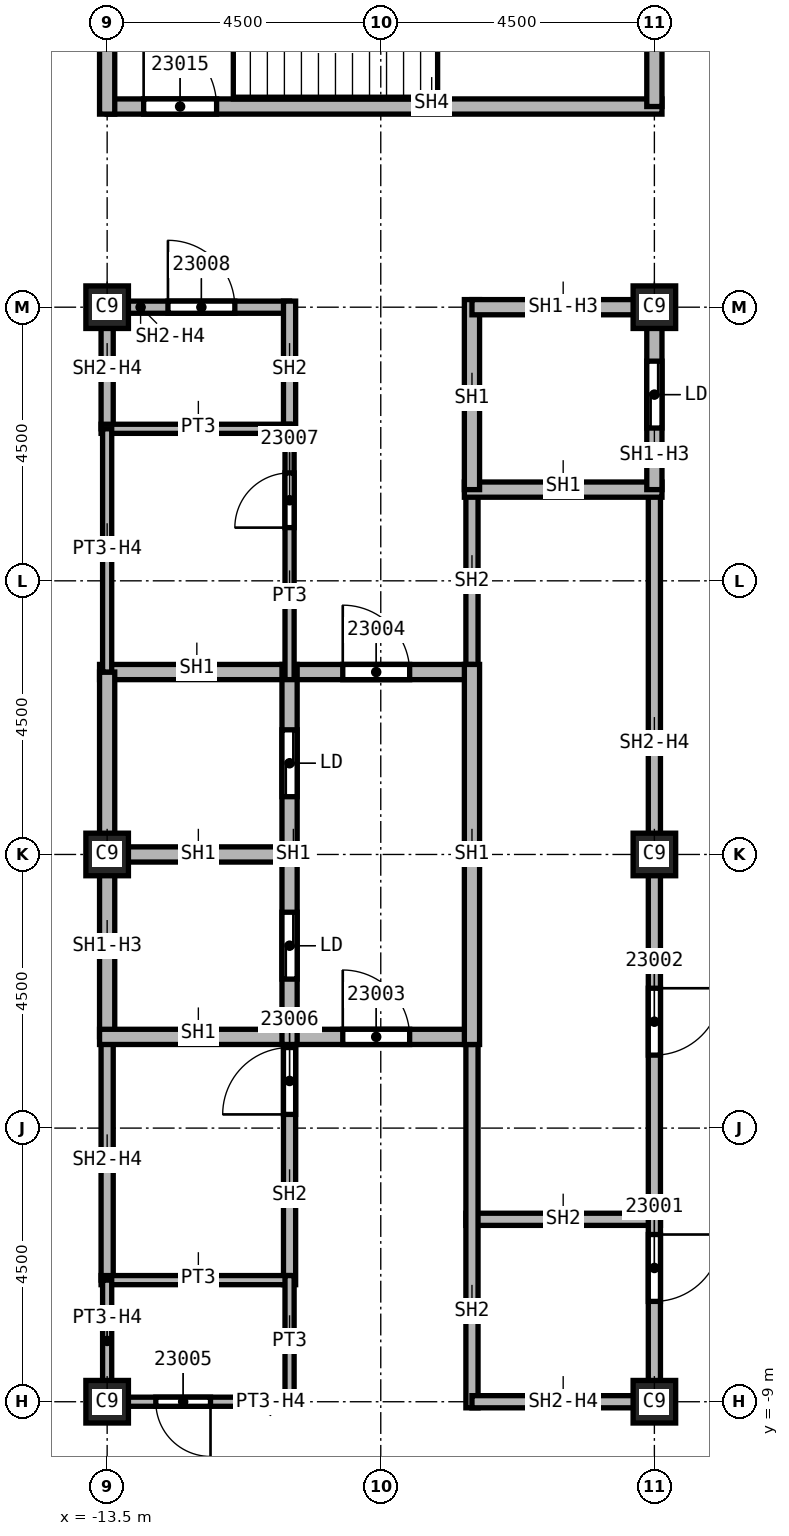
"""IFC4 building model, lengths in metres.
Left out: names, types, materials, properties, quantities, classifications, styles, units other than length and angle.
Written with IfcOpenShell. Run it as: python <this file> out.ifc"""

import sys

from ifc_helpers import new_model, si_unit, direction, frame, frame_2d, origin, origin_2d, place, context, subcontext, project, spatial, rectangle, extrude, element, fill, save


model = new_model("IFC4")
c1 = context("Model", 3, precision=1e-05, world=origin(), true_north=direction((0.0, 1.0)))
c2 = subcontext(c1, "Body", "Model", "MODEL_VIEW")
j1 = project(units=[si_unit("LENGTHUNIT", "METRE"), si_unit("PLANEANGLEUNIT", "RADIAN")], contexts=[c1])
p1 = place(None, origin())
s1 = spatial("IfcSite", under=j1, at=p1, CompositionType="ELEMENT")
p2 = place(p1, origin())
s2 = spatial("IfcBuilding", under=s1, at=p2, CompositionType="ELEMENT")
p3 = place(p2, frame((0.0, 0.0, 330.0)))
s3 = spatial("IfcBuildingStorey", under=s2, at=p3, CompositionType="ELEMENT", Elevation=330.0)
for number, where, z_axis, x_axis in (
    (1, (-4.5, 0.0, 0.0), (0.0, 0.0, 1.0), (1.0, 0.0, 0.0)),
    (2, (-4.5, 9.0, 0.0), (0.0, 0.0, 1.0), (1.0, 0.0, 0.0)),
    (3, (-4.5, -9.0, 0.0), (0.0, 0.0, 1.0), (1.0, 0.0, 0.0)),
    (4, (-13.5, 0.0, 0.0), (0.0, 0.0, 1.0), (1.0, 0.0, 0.0)),
    (5, (-13.5, 9.0, 0.0), (0.0, 0.0, 1.0), (1.0, 0.0, 0.0)),
    (6, (-13.5, -9.0, 0.0), (0.0, 0.0, 1.0), (1.0, 0.0, 0.0)),
):
    element("IfcColumn", number, at=place(p3, frame(where, z_axis=z_axis, x_axis=x_axis)), inside=s3, PredefinedType="COLUMN", context=c2, shape_type="SweptSolid", body=[
        extrude(rectangle(XDim=0.7, YDim=0.7, at=origin_2d()), origin(), (0.0, 0.0, 1.0), 3.74),
    ])
p4 = place(p3, frame((-13.5, -7.0, 0.0), z_axis=(0.0, 0.0, 1.0), x_axis=(0.0, 1.0, 0.0)))
e7 = element("IfcWall", 7, at=p4, inside=s3, PredefinedType="SOLIDWALL", context=c2, shape_type="SweptSolid", body=[
    extrude(rectangle(XDim=4.0, YDim=0.2, at=frame_2d((2.0, 0.0))), origin(), (0.0, 0.0, 1.0), 3.062),
])
p5 = place(p3, frame((-13.5, 7.0, 0.0), z_axis=(0.0, 0.0, 1.0), x_axis=(0.0, 1.0, 0.0)))
e8 = element("IfcWall", 8, at=p5, inside=s3, PredefinedType="SOLIDWALL", context=c2, shape_type="SweptSolid", body=[
    extrude(rectangle(XDim=2.1, YDim=0.2, at=frame_2d((1.05, 0.0))), origin(), (0.0, 0.0, 1.0), 3.062),
])
p6 = place(p3, frame((-13.5, 9.0, 0.0), z_axis=(0.0, 0.0, 1.0), x_axis=(1.0, 0.0, 0.0)))
e9 = element("IfcWall", 9, at=p6, inside=s3, PredefinedType="SOLIDWALL", context=c2, shape_type="SweptSolid", body=[
    extrude(rectangle(XDim=3.0, YDim=0.2, at=frame_2d((1.5, 0.0))), origin(), (0.0, 0.0, 1.0), 3.062),
])
p7 = place(p6, frame((1.0, 0.0, 0.0)))
e10 = element("IfcOpeningElement", 10, at=p7, cuts=e9, PredefinedType="OPENING", context=c2, shape_type="SweptSolid", body=[
    extrude(rectangle(XDim=1.1, YDim=2.1, at=frame_2d((0.55, 1.05))), frame((0.0, 0.1, 0.0), z_axis=(0.0, -1.0, 0.0), x_axis=(1.0, 0.0, 0.0)), (0.0, 0.0, 1.0), 0.2),
])
p8 = place(p3, frame((-10.5, -7.075, 0.0), z_axis=(0.0, 0.0, 1.0), x_axis=(0.0, 1.0, 0.0)))
e11 = element("IfcWall", 11, at=p8, inside=s3, PredefinedType="SOLIDWALL", context=c2, shape_type="SweptSolid", body=[
    extrude(rectangle(XDim=4.2, YDim=0.2, at=frame_2d((2.1, 0.0))), origin(), (0.0, 0.0, 1.0), 3.74),
])
p9 = place(p8, frame((2.8, 0.0, 0.0)))
e12 = element("IfcOpeningElement", 12, at=p9, cuts=e11, PredefinedType="OPENING", context=c2, shape_type="SweptSolid", body=[
    extrude(rectangle(XDim=1.1, YDim=2.1, at=frame_2d((0.55, 1.05))), frame((0.0, 0.1, 0.0), z_axis=(0.0, -1.0, 0.0), x_axis=(1.0, 0.0, 0.0)), (0.0, 0.0, 1.0), 0.2),
])
p10 = place(p3, frame((-10.5, 6.925, 0.0), z_axis=(0.0, 0.0, 1.0), x_axis=(0.0, 1.0, 0.0)))
e13 = element("IfcWall", 13, at=p10, inside=s3, PredefinedType="SOLIDWALL", context=c2, shape_type="SweptSolid", body=[
    extrude(rectangle(XDim=2.175, YDim=0.2, at=frame_2d((1.087, 0.0))), origin(), (0.0, 0.0, 1.0), 3.74),
])
p11 = place(p3, frame((-7.6, -6.0, 0.0), z_axis=(0.0, 0.0, 1.0), x_axis=(1.0, 0.0, 0.0)))
e14 = element("IfcWall", 14, at=p11, inside=s3, PredefinedType="SOLIDWALL", context=c2, shape_type="SweptSolid", body=[
    extrude(rectangle(XDim=3.2, YDim=0.2, at=frame_2d((1.6, 0.0))), origin(), (0.0, 0.0, 1.0), 3.74),
])
p12 = place(p3, frame((-7.5, -9.1, 0.0), z_axis=(0.0, 0.0, 1.0), x_axis=(0.0, 1.0, 0.0)))
e15 = element("IfcWall", 15, at=p12, inside=s3, PredefinedType="SOLIDWALL", context=c2, shape_type="SweptSolid", body=[
    extrude(rectangle(XDim=6.225, YDim=0.2, at=frame_2d((3.113, 0.0))), origin(), (0.0, 0.0, 1.0), 3.74),
])
p13 = place(p3, frame((-7.5, 2.875, 0.0), z_axis=(0.0, 0.0, 1.0), x_axis=(0.0, 1.0, 0.0)))
e16 = element("IfcWall", 16, at=p13, inside=s3, PredefinedType="SOLIDWALL", context=c2, shape_type="SweptSolid", body=[
    extrude(rectangle(XDim=3.125, YDim=0.2, at=frame_2d((1.562, 0.0))), origin(), (0.0, 0.0, 1.0), 3.74),
])
p14 = place(p3, frame((-4.5, -9.0, 0.0), z_axis=(0.0, 0.0, 1.0), x_axis=(-1.0, 0.0, 0.0)))
e17 = element("IfcWall", 17, at=p14, inside=s3, PredefinedType="SOLIDWALL", context=c2, shape_type="SweptSolid", body=[
    extrude(rectangle(XDim=3.0, YDim=0.2, at=frame_2d((1.5, 0.0))), origin(), (0.0, 0.0, 1.0), 3.062),
])
p15 = place(p3, frame((-4.5, 6.0, 0.0), z_axis=(0.0, 0.0, 1.0), x_axis=(0.0, -1.0, 0.0)))
e18 = element("IfcWall", 18, at=p15, inside=s3, PredefinedType="SOLIDWALL", context=c2, shape_type="SweptSolid", body=[
    extrude(rectangle(XDim=15.1, YDim=0.2, at=frame_2d((7.55, 0.0))), origin(), (0.0, 0.0, 1.0), 3.062),
])
p16 = place(p15, frame((12.25, 0.0, 0.0)))
e19 = element("IfcOpeningElement", 19, at=p16, cuts=e18, PredefinedType="OPENING", context=c2, shape_type="SweptSolid", body=[
    extrude(rectangle(XDim=1.1, YDim=2.1, at=frame_2d((0.55, 1.05))), frame((0.0, 0.1, 0.0), z_axis=(0.0, -1.0, 0.0), x_axis=(1.0, 0.0, 0.0)), (0.0, 0.0, 1.0), 0.2),
])
p17 = place(p15, frame((8.2, 0.0, 0.0)))
e20 = element("IfcOpeningElement", 20, at=p17, cuts=e18, PredefinedType="OPENING", context=c2, shape_type="SweptSolid", body=[
    extrude(rectangle(XDim=1.1, YDim=2.1, at=frame_2d((0.55, 1.05))), frame((0.0, 0.1, 0.0), z_axis=(0.0, -1.0, 0.0), x_axis=(1.0, 0.0, 0.0)), (0.0, 0.0, 1.0), 0.2),
])
p18 = place(p3, frame((-13.625, 0.0, 0.0), z_axis=(0.0, 0.0, 1.0), x_axis=(1.0, 0.0, 0.0)))
e21 = element("IfcWall", 21, at=p18, inside=s3, PredefinedType="SOLIDWALL", context=c2, shape_type="SweptSolid", body=[
    extrude(rectangle(XDim=3.125, YDim=0.25, at=frame_2d((1.562, 0.0))), origin(), (0.0, 0.0, 1.0), 3.74),
])
p19 = place(p3, frame((-13.625, 3.0, 0.0), z_axis=(0.0, 0.0, 1.0), x_axis=(1.0, 0.0, 0.0)))
e22 = element("IfcWall", 22, at=p19, inside=s3, PredefinedType="SOLIDWALL", context=c2, shape_type="SweptSolid", body=[
    extrude(rectangle(XDim=6.125, YDim=0.25, at=frame_2d((3.062, 0.0))), origin(), (0.0, 0.0, 1.0), 3.74),
])
p20 = place(p19, frame((4.0, 0.0, 0.0)))
e23 = element("IfcOpeningElement", 23, at=p20, cuts=e22, PredefinedType="OPENING", context=c2, shape_type="SweptSolid", body=[
    extrude(rectangle(XDim=1.1, YDim=2.1, at=frame_2d((0.55, 1.05))), frame((0.0, 0.125, 0.0), z_axis=(0.0, -1.0, 0.0), x_axis=(1.0, 0.0, 0.0)), (0.0, 0.0, 1.0), 0.25),
])
p21 = place(p3, frame((-13.5, -3.0, 0.0), z_axis=(0.0, 0.0, 1.0), x_axis=(0.0, 1.0, 0.0)))
e24 = element("IfcWall", 24, at=p21, inside=s3, PredefinedType="SOLIDWALL", context=c2, shape_type="SweptSolid", body=[
    extrude(rectangle(XDim=6.0, YDim=0.25, at=frame_2d((3.0, 0.0))), origin(), (0.0, 0.0, 1.0), 3.062),
])
p22 = place(p3, frame((-13.625, -3.0, 0.0), z_axis=(0.0, 0.0, 1.0), x_axis=(1.0, 0.0, 0.0)))
e25 = element("IfcWall", 25, at=p22, inside=s3, PredefinedType="SOLIDWALL", context=c2, shape_type="SweptSolid", body=[
    extrude(rectangle(XDim=6.125, YDim=0.25, at=frame_2d((3.062, 0.0))), origin(), (0.0, 0.0, 1.0), 3.74),
])
p23 = place(p22, frame((4.0, 0.0, 0.0)))
e26 = element("IfcOpeningElement", 26, at=p23, cuts=e25, PredefinedType="OPENING", context=c2, shape_type="SweptSolid", body=[
    extrude(rectangle(XDim=1.1, YDim=2.1, at=frame_2d((0.55, 1.05))), frame((0.0, 0.125, 0.0), z_axis=(0.0, -1.0, 0.0), x_axis=(1.0, 0.0, 0.0)), (0.0, 0.0, 1.0), 0.25),
])
p24 = place(p3, frame((-10.5, -3.125, 0.0), z_axis=(0.0, 0.0, 1.0), x_axis=(0.0, 1.0, 0.0)))
e27 = element("IfcWall", 27, at=p24, inside=s3, PredefinedType="SOLIDWALL", context=c2, shape_type="SweptSolid", body=[
    extrude(rectangle(XDim=6.25, YDim=0.25, at=frame_2d((3.125, 0.0))), origin(), (0.0, 0.0, 1.0), 3.74),
])
p25 = place(p24, frame((1.075, 0.0, 0.0)))
e28 = element("IfcOpeningElement", 28, at=p25, cuts=e27, PredefinedType="OPENING", context=c2, shape_type="SweptSolid", body=[
    extrude(rectangle(XDim=1.1, YDim=2.1, at=frame_2d((0.55, 1.05))), frame((0.0, 0.125, 0.0), z_axis=(0.0, -1.0, 0.0), x_axis=(1.0, 0.0, 0.0)), (0.0, 0.0, 1.0), 0.25),
])
p26 = place(p24, frame((4.075, 0.0, 0.0)))
e29 = element("IfcOpeningElement", 29, at=p26, cuts=e27, PredefinedType="OPENING", context=c2, shape_type="SweptSolid", body=[
    extrude(rectangle(XDim=1.1, YDim=2.1, at=frame_2d((0.55, 1.05))), frame((0.0, 0.125, 0.0), z_axis=(0.0, -1.0, 0.0), x_axis=(1.0, 0.0, 0.0)), (0.0, 0.0, 1.0), 0.25),
])
p27 = place(p3, frame((-7.625, 6.0, 0.0), z_axis=(0.0, 0.0, 1.0), x_axis=(1.0, 0.0, 0.0)))
e30 = element("IfcWall", 30, at=p27, inside=s3, PredefinedType="SOLIDWALL", context=c2, shape_type="SweptSolid", body=[
    extrude(rectangle(XDim=3.25, YDim=0.25, at=frame_2d((1.625, 0.0))), origin(), (0.0, 0.0, 1.0), 3.74),
])
p28 = place(p3, frame((-7.5, -3.125, 0.0), z_axis=(0.0, 0.0, 1.0), x_axis=(0.0, 1.0, 0.0)))
e31 = element("IfcWall", 31, at=p28, inside=s3, PredefinedType="SOLIDWALL", context=c2, shape_type="SweptSolid", body=[
    extrude(rectangle(XDim=6.25, YDim=0.25, at=frame_2d((3.125, 0.0))), origin(), (0.0, 0.0, 1.0), 3.74),
])
p29 = place(p3, frame((-7.5, 6.0, 0.0), z_axis=(0.0, 0.0, 1.0), x_axis=(0.0, 1.0, 0.0)))
e32 = element("IfcWall", 32, at=p29, inside=s3, PredefinedType="SOLIDWALL", context=c2, shape_type="SweptSolid", body=[
    extrude(rectangle(XDim=3.125, YDim=0.25, at=frame_2d((1.562, 0.0))), origin(), (0.0, 0.0, 1.0), 3.74),
])
p30 = place(p3, frame((-7.5, 9.0, 0.0), z_axis=(0.0, 0.0, 1.0), x_axis=(1.0, 0.0, 0.0)))
e33 = element("IfcWall", 33, at=p30, inside=s3, PredefinedType="SOLIDWALL", context=c2, shape_type="SweptSolid", body=[
    extrude(rectangle(XDim=3.0, YDim=0.25, at=frame_2d((1.5, 0.0))), origin(), (0.0, 0.0, 1.0), 3.062),
])
p31 = place(p3, frame((-4.5, 9.125, 0.0), z_axis=(0.0, 0.0, 1.0), x_axis=(0.0, -1.0, 0.0)))
e34 = element("IfcWall", 34, at=p31, inside=s3, PredefinedType="SOLIDWALL", context=c2, shape_type="SweptSolid", body=[
    extrude(rectangle(XDim=3.125, YDim=0.25, at=frame_2d((1.562, 0.0))), origin(), (0.0, 0.0, 1.0), 3.062),
])
p32 = place(p31, frame((1.012, 0.0, 0.0)))
e35 = element("IfcOpeningElement", 35, at=p32, cuts=e34, PredefinedType="OPENING", context=c2, shape_type="SweptSolid", body=[
    extrude(rectangle(XDim=1.1, YDim=2.1, at=frame_2d((0.55, 1.05))), frame((0.0, 0.125, 0.0), z_axis=(0.0, -1.0, 0.0), x_axis=(1.0, 0.0, 0.0)), (0.0, 0.0, 1.0), 0.25),
])
p33 = place(p3, frame((-13.5, 12.3, 0.0), z_axis=(0.0, 0.0, 1.0), x_axis=(1.0, 0.0, 0.0)))
e36 = element("IfcWall", 36, at=p33, inside=s3, PredefinedType="SOLIDWALL", context=c2, shape_type="SweptSolid", body=[
    extrude(rectangle(XDim=9.125, YDim=0.25, at=frame_2d((4.562, 0.0))), origin(), (0.0, 0.0, 1.0), 3.74),
])
p34 = place(p33, frame((0.6, 0.0, 0.0)))
e37 = element("IfcOpeningElement", 37, at=p34, cuts=e36, PredefinedType="OPENING", context=c2, shape_type="SweptSolid", body=[
    extrude(rectangle(XDim=1.2, YDim=2.1, at=frame_2d((0.6, 1.05))), frame((0.0, 0.125, 0.0), z_axis=(0.0, -1.0, 0.0), x_axis=(1.0, 0.0, 0.0)), (0.0, 0.0, 1.0), 0.25),
])
p35 = place(p3, frame((-13.5, 12.175, 0.0), z_axis=(0.0, 0.0, 1.0), x_axis=(0.0, 1.0, 0.0)))
e38 = element("IfcWall", 38, at=p35, inside=s3, PredefinedType="SOLIDWALL", context=c2, shape_type="SweptSolid", body=[
    extrude(rectangle(XDim=4.75, YDim=0.25, at=frame_2d((2.375, 0.0))), origin(), (0.0, 0.0, 1.0), 3.74),
])
p36 = place(p3, frame((-4.5, 16.8, 0.0), z_axis=(0.0, 0.0, 1.0), x_axis=(0.0, -1.0, 0.0)))
e39 = element("IfcWall", 39, at=p36, inside=s3, PredefinedType="SOLIDWALL", context=c2, shape_type="SweptSolid", body=[
    extrude(rectangle(XDim=4.5, YDim=0.25, at=frame_2d((2.25, 0.0))), origin(), (0.0, 0.0, 1.0), 3.74),
])
for number, where, z_axis, x_axis in (
    (40, (-13.6, -7.0, 0.0), (0.0, 0.0, 1.0), (1.0, 0.0, 0.0)),
    (41, (-13.6, 7.0, 0.0), (0.0, 0.0, 1.0), (1.0, 0.0, 0.0)),
):
    element("IfcWall", number, at=place(p3, frame(where, z_axis=z_axis, x_axis=x_axis)), inside=s3, PredefinedType="PARTITIONING", context=c2, shape_type="SweptSolid", body=[
        extrude(rectangle(XDim=3.1, YDim=0.15, at=frame_2d((1.55, 0.0))), origin(), (0.0, 0.0, 1.0), 3.74),
    ])
p37 = place(p3, frame((-13.5, -9.075, 0.0), z_axis=(0.0, 0.0, 1.0), x_axis=(0.0, 1.0, 0.0)))
e42 = element("IfcWall", 42, at=p37, inside=s3, PredefinedType="PARTITIONING", context=c2, shape_type="SweptSolid", body=[
    extrude(rectangle(XDim=2.075, YDim=0.15, at=frame_2d((1.038, 0.0))), origin(), (0.0, 0.0, 1.0), 3.062),
])
p38 = place(p3, frame((-13.5, 3.0, 0.0), z_axis=(0.0, 0.0, 1.0), x_axis=(0.0, 1.0, 0.0)))
e43 = element("IfcWall", 43, at=p38, inside=s3, PredefinedType="PARTITIONING", context=c2, shape_type="SweptSolid", body=[
    extrude(rectangle(XDim=4.0, YDim=0.15, at=frame_2d((2.0, 0.0))), origin(), (0.0, 0.0, 1.0), 3.062),
])
p39 = place(p3, frame((-10.5, -9.075, 0.0), z_axis=(0.0, 0.0, 1.0), x_axis=(0.0, 1.0, 0.0)))
e44 = element("IfcWall", 44, at=p39, inside=s3, PredefinedType="PARTITIONING", context=c2, shape_type="SweptSolid", body=[
    extrude(rectangle(XDim=2.15, YDim=0.15, at=frame_2d((1.075, 0.0))), origin(), (0.0, 0.0, 1.0), 3.74),
])
p40 = place(p3, frame((-10.5, -9.0, 0.0), z_axis=(0.0, 0.0, 1.0), x_axis=(-1.0, 0.0, 0.0)))
e45 = element("IfcWall", 45, at=p40, inside=s3, PredefinedType="PARTITIONING", context=c2, shape_type="SweptSolid", body=[
    extrude(rectangle(XDim=3.0, YDim=0.15, at=frame_2d((1.5, 0.0))), origin(), (0.0, 0.0, 1.0), 3.062),
])
p41 = place(p40, frame((1.3, 0.0, 0.0)))
e46 = element("IfcOpeningElement", 46, at=p41, cuts=e45, PredefinedType="OPENING", context=c2, shape_type="SweptSolid", body=[
    extrude(rectangle(XDim=0.9, YDim=2.1, at=frame_2d((0.45, 1.05))), frame((0.0, 0.075, 0.0), z_axis=(0.0, -1.0, 0.0), x_axis=(1.0, 0.0, 0.0)), (0.0, 0.0, 1.0), 0.15),
])
p42 = place(p3, frame((-10.5, 2.875, 0.0), z_axis=(0.0, 0.0, 1.0), x_axis=(0.0, 1.0, 0.0)))
e47 = element("IfcWall", 47, at=p42, inside=s3, PredefinedType="PARTITIONING", context=c2, shape_type="SweptSolid", body=[
    extrude(rectangle(XDim=4.2, YDim=0.15, at=frame_2d((2.1, 0.0))), origin(), (0.0, 0.0, 1.0), 3.74),
])
p43 = place(p42, frame((2.5, 0.0, 0.0)))
e48 = element("IfcOpeningElement", 48, at=p43, cuts=e47, PredefinedType="OPENING", context=c2, shape_type="SweptSolid", body=[
    extrude(rectangle(XDim=0.9, YDim=2.1, at=frame_2d((0.45, 1.05))), frame((0.0, 0.075, 0.0), z_axis=(0.0, -1.0, 0.0), x_axis=(1.0, 0.0, 0.0)), (0.0, 0.0, 1.0), 0.15),
])
p44 = place(p16, origin())
e49 = element("IfcDoor", 49, at=p44, inside=s3, OperationType="SINGLE_SWING_RIGHT", PredefinedType="DOOR", context=c2, shape_type="SweptSolid", body=[
    extrude(rectangle(XDim=1.1, YDim=2.1, at=frame_2d((0.55, 1.05))), frame((0.0, 0.025, 0.0), z_axis=(0.0, -1.0, 0.0), x_axis=(1.0, 0.0, 0.0)), (0.0, 0.0, 1.0), 0.05),
])
fill(e19, e49)
p45 = place(p17, origin())
e50 = element("IfcDoor", 50, at=p45, inside=s3, OperationType="SINGLE_SWING_LEFT", PredefinedType="DOOR", context=c2, shape_type="SweptSolid", body=[
    extrude(rectangle(XDim=1.1, YDim=2.1, at=frame_2d((0.55, 1.05))), frame((0.0, 0.025, 0.0), z_axis=(0.0, -1.0, 0.0), x_axis=(1.0, 0.0, 0.0)), (0.0, 0.0, 1.0), 0.05),
])
fill(e20, e50)
p46 = place(p23, origin())
e51 = element("IfcDoor", 51, at=p46, inside=s3, OperationType="SINGLE_SWING_RIGHT", PredefinedType="DOOR", context=c2, shape_type="SweptSolid", body=[
    extrude(rectangle(XDim=1.1, YDim=2.1, at=frame_2d((0.55, 1.05))), frame((0.0, 0.025, 0.0), z_axis=(0.0, -1.0, 0.0), x_axis=(1.0, 0.0, 0.0)), (0.0, 0.0, 1.0), 0.05),
])
fill(e26, e51)
p47 = place(p20, origin())
e52 = element("IfcDoor", 52, at=p47, inside=s3, OperationType="SINGLE_SWING_LEFT", PredefinedType="DOOR", context=c2, shape_type="SweptSolid", body=[
    extrude(rectangle(XDim=1.1, YDim=2.1, at=frame_2d((0.55, 1.05))), frame((0.0, 0.025, 0.0), z_axis=(0.0, -1.0, 0.0), x_axis=(1.0, 0.0, 0.0)), (0.0, 0.0, 1.0), 0.05),
])
fill(e23, e52)
p48 = place(p41, origin())
e53 = element("IfcDoor", 53, at=p48, inside=s3, OperationType="SINGLE_SWING_RIGHT", PredefinedType="DOOR", context=c2, shape_type="SweptSolid", body=[
    extrude(rectangle(XDim=0.9, YDim=2.1, at=frame_2d((0.45, 1.05))), frame((0.0, 0.025, 0.0), z_axis=(0.0, -1.0, 0.0), x_axis=(1.0, 0.0, 0.0)), (0.0, 0.0, 1.0), 0.05),
])
fill(e46, e53)
p49 = place(p9, origin())
e54 = element("IfcDoor", 54, at=p49, inside=s3, OperationType="SINGLE_SWING_LEFT", PredefinedType="DOOR", context=c2, shape_type="SweptSolid", body=[
    extrude(rectangle(XDim=1.1, YDim=2.1, at=frame_2d((0.55, 1.05))), frame((0.0, 0.025, 0.0), z_axis=(0.0, -1.0, 0.0), x_axis=(1.0, 0.0, 0.0)), (0.0, 0.0, 1.0), 0.05),
])
fill(e12, e54)
p50 = place(p43, origin())
e55 = element("IfcDoor", 55, at=p50, inside=s3, OperationType="SINGLE_SWING_RIGHT", PredefinedType="DOOR", context=c2, shape_type="SweptSolid", body=[
    extrude(rectangle(XDim=0.9, YDim=2.1, at=frame_2d((0.45, 1.05))), frame((0.0, 0.025, 0.0), z_axis=(0.0, -1.0, 0.0), x_axis=(1.0, 0.0, 0.0)), (0.0, 0.0, 1.0), 0.05),
])
fill(e48, e55)
p51 = place(p7, origin())
e56 = element("IfcDoor", 56, at=p51, inside=s3, OperationType="SINGLE_SWING_LEFT", PredefinedType="DOOR", context=c2, shape_type="SweptSolid", body=[
    extrude(rectangle(XDim=1.1, YDim=2.1, at=frame_2d((0.55, 1.05))), frame((0.0, 0.025, 0.0), z_axis=(0.0, -1.0, 0.0), x_axis=(1.0, 0.0, 0.0)), (0.0, 0.0, 1.0), 0.05),
])
fill(e10, e56)
p52 = place(p34, origin())
e57 = element("IfcDoor", 57, at=p52, inside=s3, OperationType="SINGLE_SWING_RIGHT", PredefinedType="DOOR", context=c2, shape_type="SweptSolid", body=[
    extrude(rectangle(XDim=1.2, YDim=2.1, at=frame_2d((0.6, 1.05))), frame((0.0, 0.025, 0.0), z_axis=(0.0, -1.0, 0.0), x_axis=(1.0, 0.0, 0.0)), (0.0, 0.0, 1.0), 0.05),
])
fill(e37, e57)
p53 = place(p32, origin())
e58 = element("IfcDoor", 58, at=p53, inside=s3, OperationType="SLIDING_TO_LEFT", PredefinedType="DOOR", context=c2, shape_type="SweptSolid", body=[
    extrude(rectangle(XDim=1.1, YDim=2.1, at=frame_2d((0.55, 1.05))), frame((0.0, 0.025, 0.0), z_axis=(0.0, -1.0, 0.0), x_axis=(1.0, 0.0, 0.0)), (0.0, 0.0, 1.0), 0.05),
])
fill(e35, e58)
p54 = place(p25, origin())
e59 = element("IfcDoor", 59, at=p54, inside=s3, OperationType="SLIDING_TO_LEFT", PredefinedType="DOOR", context=c2, shape_type="SweptSolid", body=[
    extrude(rectangle(XDim=1.1, YDim=2.1, at=frame_2d((0.55, 1.05))), frame((0.0, 0.025, 0.0), z_axis=(0.0, -1.0, 0.0), x_axis=(1.0, 0.0, 0.0)), (0.0, 0.0, 1.0), 0.05),
])
fill(e28, e59)
p55 = place(p26, origin())
e60 = element("IfcDoor", 60, at=p55, inside=s3, OperationType="SLIDING_TO_LEFT", PredefinedType="DOOR", context=c2, shape_type="SweptSolid", body=[
    extrude(rectangle(XDim=1.1, YDim=2.1, at=frame_2d((0.55, 1.05))), frame((0.0, 0.025, 0.0), z_axis=(0.0, -1.0, 0.0), x_axis=(1.0, 0.0, 0.0)), (0.0, 0.0, 1.0), 0.05),
])
fill(e29, e60)
save(model, sys.argv[1])
